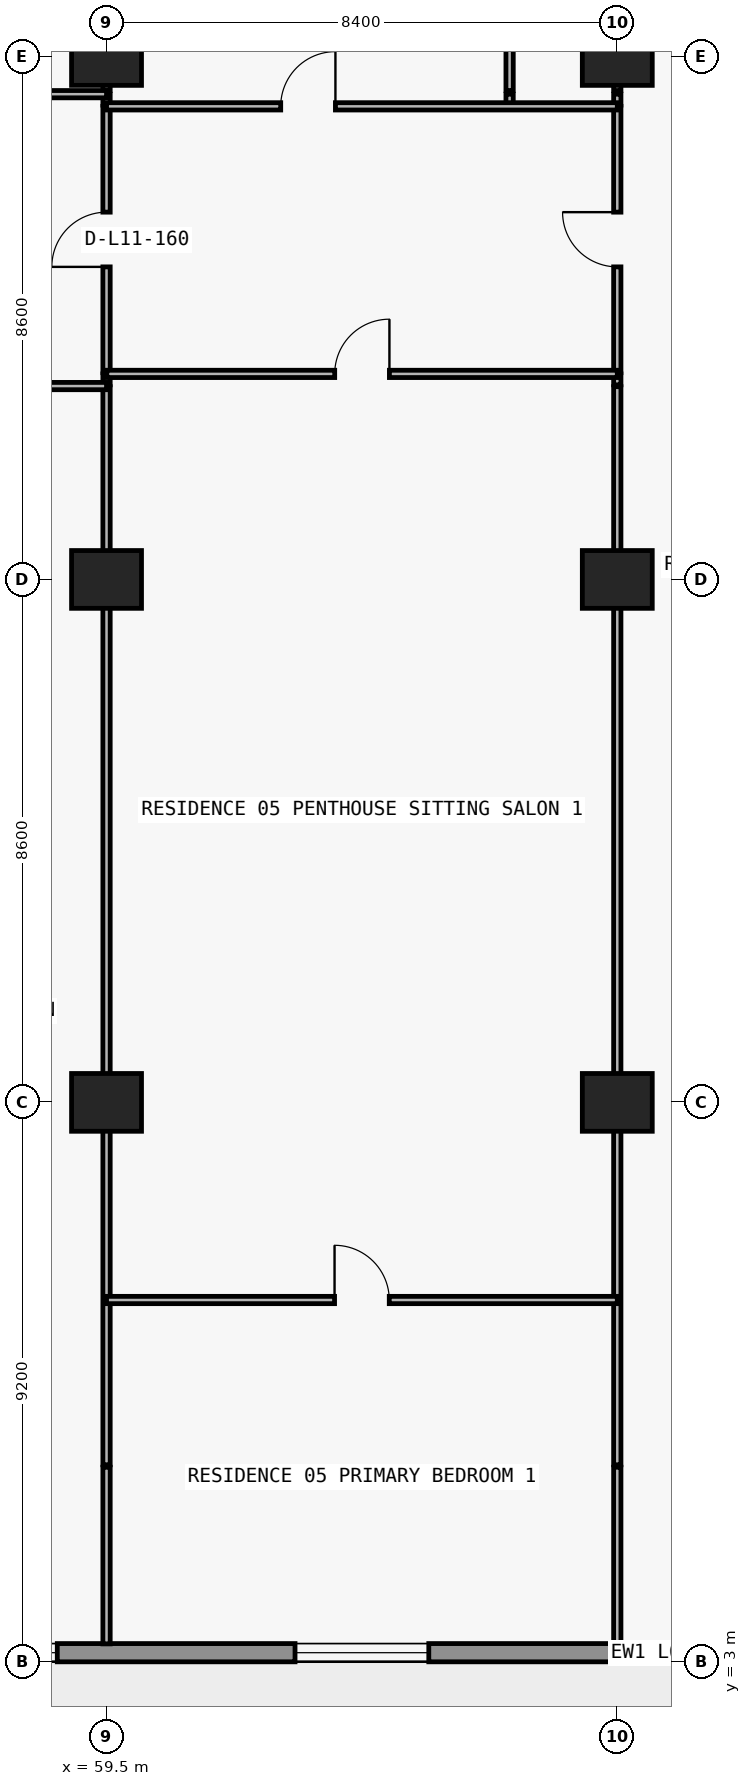
"""IFC4 building model, lengths in metres.
Left out: names, types, materials, properties, quantities, classifications, styles, units other than length and angle.
Written with IfcOpenShell. Run it as: python <this file> out.ifc"""

import sys

from ifc_helpers import new_model, si_unit, direction, frame, frame_2d, origin, origin_2d, place, context, subcontext, project, spatial, rectangle, extrude, element, fill, save


model = new_model("IFC4")
c1 = context("Model", 3, precision=1e-05, world=origin(), true_north=direction((0.0, 1.0)))
c2 = subcontext(c1, "Body", "Model", "MODEL_VIEW")
j1 = project(units=[si_unit("LENGTHUNIT", "METRE"), si_unit("PLANEANGLEUNIT", "RADIAN")], contexts=[c1])
p1 = place(None, origin())
s1 = spatial("IfcSite", under=j1, at=p1, CompositionType="ELEMENT")
p2 = place(p1, origin())
s2 = spatial("IfcBuilding", under=s1, at=p2, CompositionType="ELEMENT")
p3 = place(p2, frame((0.0, 0.0, 46.5)))
s3 = spatial("IfcBuildingStorey", under=s2, at=p3, CompositionType="ELEMENT", Elevation=46.5)
for number, where, z_axis, x_axis in (
    (1, (59.5, 12.2, 0.0), (0.0, 0.0, 1.0), (1.0, 0.0, 0.0)),
    (2, (67.9, 12.2, 0.0), (0.0, 0.0, 1.0), (1.0, 0.0, 0.0)),
    (3, (59.5, 20.8, 0.0), (0.0, 0.0, 1.0), (1.0, 0.0, 0.0)),
    (4, (67.9, 20.8, 0.0), (0.0, 0.0, 1.0), (1.0, 0.0, 0.0)),
    (5, (59.5, 29.4, 0.0), (0.0, 0.0, 1.0), (1.0, 0.0, 0.0)),
    (6, (67.9, 29.4, 0.0), (0.0, 0.0, 1.0), (1.0, 0.0, 0.0)),
):
    element("IfcColumn", number, at=place(p3, frame(where, z_axis=z_axis, x_axis=x_axis)), inside=s3, PredefinedType="COLUMN", context=c2, shape_type="SweptSolid", body=[
        extrude(rectangle(XDim=1.15, YDim=0.95, at=origin_2d()), origin(), (0.0, 0.0, 1.0), 3.05),
    ])
p4 = place(p3, frame((72.7, 3.15, 0.0), z_axis=(0.0, 0.0, 1.0), x_axis=(-1.0, 0.0, 0.0)))
e7 = element("IfcWall", 7, at=p4, inside=s3, PredefinedType="STANDARD", context=c2, shape_type="SweptSolid", body=[
    extrude(rectangle(XDim=67.6, YDim=0.3, at=frame_2d((33.8, 0.0))), origin(), (0.0, 0.0, 1.0), 3.05),
])
p5 = place(p4, frame((59.89, 0.0, 0.0)))
e8 = element("IfcOpeningElement", 8, at=p5, cuts=e7, PredefinedType="OPENING", context=c2, shape_type="SweptSolid", body=[
    extrude(rectangle(XDim=2.0, YDim=2.3, at=frame_2d((1.0, 1.15))), frame((0.0, 0.16, 0.0), z_axis=(0.0, -1.0, 0.0), x_axis=(1.0, 0.0, 0.0)), (0.0, 0.0, 1.0), 0.32),
])
p6 = place(p4, frame((55.21, 0.0, 0.65)))
e9 = element("IfcOpeningElement", 9, at=p6, cuts=e7, PredefinedType="OPENING", context=c2, shape_type="SweptSolid", body=[
    extrude(rectangle(XDim=2.6, YDim=1.85, at=frame_2d((1.3, 0.925))), frame((0.0, 0.16, 0.0), z_axis=(0.0, -1.0, 0.0), x_axis=(1.0, 0.0, 0.0)), (0.0, 0.0, 1.0), 0.32),
])
p7 = place(p4, frame((49.1, 0.0, 0.85)))
e10 = element("IfcOpeningElement", 10, at=p7, cuts=e7, PredefinedType="OPENING", context=c2, shape_type="SweptSolid", body=[
    extrude(rectangle(XDim=2.2, YDim=1.55, at=frame_2d((1.1, 0.775))), frame((0.0, 0.16, 0.0), z_axis=(0.0, -1.0, 0.0), x_axis=(1.0, 0.0, 0.0)), (0.0, 0.0, 1.0), 0.32),
])
p8 = place(p4, frame((42.69, 0.0, 0.0)))
e11 = element("IfcOpeningElement", 11, at=p8, cuts=e7, PredefinedType="OPENING", context=c2, shape_type="SweptSolid", body=[
    extrude(rectangle(XDim=2.0, YDim=2.3, at=frame_2d((1.0, 1.15))), frame((0.0, 0.16, 0.0), z_axis=(0.0, -1.0, 0.0), x_axis=(1.0, 0.0, 0.0)), (0.0, 0.0, 1.0), 0.32),
])
p9 = place(p4, frame((38.59, 0.0, 0.85)))
e12 = element("IfcOpeningElement", 12, at=p9, cuts=e7, PredefinedType="OPENING", context=c2, shape_type="SweptSolid", body=[
    extrude(rectangle(XDim=1.8, YDim=1.55, at=frame_2d((0.9, 0.775))), frame((0.0, 0.16, 0.0), z_axis=(0.0, -1.0, 0.0), x_axis=(1.0, 0.0, 0.0)), (0.0, 0.0, 1.0), 0.32),
])
p10 = place(p4, frame((30.914, 0.0, 0.85)))
e13 = element("IfcOpeningElement", 13, at=p10, cuts=e7, PredefinedType="OPENING", context=c2, shape_type="SweptSolid", body=[
    extrude(rectangle(XDim=2.2, YDim=1.55, at=frame_2d((1.1, 0.775))), frame((0.0, 0.16, 0.0), z_axis=(0.0, -1.0, 0.0), x_axis=(1.0, 0.0, 0.0)), (0.0, 0.0, 1.0), 0.32),
])
p11 = place(p4, frame((26.69, 0.0, 0.0)))
e14 = element("IfcOpeningElement", 14, at=p11, cuts=e7, PredefinedType="OPENING", context=c2, shape_type="SweptSolid", body=[
    extrude(rectangle(XDim=2.0, YDim=2.3, at=frame_2d((1.0, 1.15))), frame((0.0, 0.16, 0.0), z_axis=(0.0, -1.0, 0.0), x_axis=(1.0, 0.0, 0.0)), (0.0, 0.0, 1.0), 0.32),
])
p12 = place(p4, frame((22.59, 0.0, 0.85)))
e15 = element("IfcOpeningElement", 15, at=p12, cuts=e7, PredefinedType="OPENING", context=c2, shape_type="SweptSolid", body=[
    extrude(rectangle(XDim=1.8, YDim=1.55, at=frame_2d((0.9, 0.775))), frame((0.0, 0.16, 0.0), z_axis=(0.0, -1.0, 0.0), x_axis=(1.0, 0.0, 0.0)), (0.0, 0.0, 1.0), 0.32),
])
p13 = place(p4, frame((18.69, 0.0, 0.0)))
e16 = element("IfcOpeningElement", 16, at=p13, cuts=e7, PredefinedType="OPENING", context=c2, shape_type="SweptSolid", body=[
    extrude(rectangle(XDim=2.0, YDim=2.3, at=frame_2d((1.0, 1.15))), frame((0.0, 0.16, 0.0), z_axis=(0.0, -1.0, 0.0), x_axis=(1.0, 0.0, 0.0)), (0.0, 0.0, 1.0), 0.32),
])
p14 = place(p4, frame((14.01, 0.0, 0.65)))
e17 = element("IfcOpeningElement", 17, at=p14, cuts=e7, PredefinedType="OPENING", context=c2, shape_type="SweptSolid", body=[
    extrude(rectangle(XDim=2.6, YDim=1.85, at=frame_2d((1.3, 0.925))), frame((0.0, 0.16, 0.0), z_axis=(0.0, -1.0, 0.0), x_axis=(1.0, 0.0, 0.0)), (0.0, 0.0, 1.0), 0.32),
])
p15 = place(p4, frame((7.9, 0.0, 0.85)))
e18 = element("IfcOpeningElement", 18, at=p15, cuts=e7, PredefinedType="OPENING", context=c2, shape_type="SweptSolid", body=[
    extrude(rectangle(XDim=2.2, YDim=1.55, at=frame_2d((1.1, 0.775))), frame((0.0, 0.16, 0.0), z_axis=(0.0, -1.0, 0.0), x_axis=(1.0, 0.0, 0.0)), (0.0, 0.0, 1.0), 0.32),
])
p16 = place(p3, frame((59.5, 3.295, 0.0), z_axis=(0.0, 0.0, 1.0), x_axis=(0.0, 1.0, 0.0)))
e19 = element("IfcWall", 19, at=p16, inside=s3, PredefinedType="PARTITIONING", context=c2, shape_type="SweptSolid", body=[
    extrude(rectangle(XDim=2.905, YDim=0.12, at=frame_2d((1.453, 0.0))), origin(), (0.0, 0.0, 1.0), 3.05),
])
p17 = place(p3, frame((59.5, 6.24, 0.0), z_axis=(0.0, 0.0, 1.0), x_axis=(0.0, 1.0, 0.0)))
e20 = element("IfcWall", 20, at=p17, inside=s3, PredefinedType="PARTITIONING", context=c2, shape_type="SweptSolid", body=[
    extrude(rectangle(XDim=17.73, YDim=0.12, at=frame_2d((8.865, 0.0))), origin(), (0.0, 0.0, 1.0), 2.11),
])
p18 = place(p3, frame((59.5, 24.0, 0.0), z_axis=(0.0, 0.0, 1.0), x_axis=(0.0, 1.0, 0.0)))
e21 = element("IfcWall", 21, at=p18, inside=s3, PredefinedType="PARTITIONING", context=c2, shape_type="SweptSolid", body=[
    extrude(rectangle(XDim=0.18, YDim=0.12, at=frame_2d((0.09, 0.0))), origin(), (0.0, 0.0, 1.0), 2.11),
])
p19 = place(p3, frame((59.5, 24.2, 0.0), z_axis=(0.0, 0.0, 1.0), x_axis=(0.0, 1.0, 0.0)))
e22 = element("IfcWall", 22, at=p19, inside=s3, PredefinedType="PARTITIONING", context=c2, shape_type="SweptSolid", body=[
    extrude(rectangle(XDim=4.38, YDim=0.12, at=frame_2d((2.19, 0.0))), origin(), (0.0, 0.0, 1.0), 2.11),
])
p20 = place(p19, frame((1.74, 0.0, 0.0)))
e23 = element("IfcOpeningElement", 23, at=p20, cuts=e22, PredefinedType="OPENING", context=c2, shape_type="SweptSolid", body=[
    extrude(rectangle(XDim=0.9, YDim=2.06, at=frame_2d((0.45, 1.03))), frame((0.0, 0.07, 0.0), z_axis=(0.0, -1.0, 0.0), x_axis=(1.0, 0.0, 0.0)), (0.0, 0.0, 1.0), 0.14),
])
p21 = place(p3, frame((59.5, 28.6, 0.0), z_axis=(0.0, 0.0, 1.0), x_axis=(0.0, 1.0, 0.0)))
e24 = element("IfcWall", 24, at=p21, inside=s3, PredefinedType="PARTITIONING", context=c2, shape_type="SweptSolid", body=[
    extrude(rectangle(XDim=0.18, YDim=0.12, at=frame_2d((0.09, 0.0))), origin(), (0.0, 0.0, 1.0), 2.11),
])
p22 = place(p3, frame((59.5, 28.84, 0.0), z_axis=(0.0, 0.0, 1.0), x_axis=(0.0, 1.0, 0.0)))
e25 = element("IfcWall", 25, at=p22, inside=s3, PredefinedType="PARTITIONING", context=c2, shape_type="SweptSolid", body=[
    extrude(rectangle(XDim=5.16, YDim=0.12, at=frame_2d((2.58, 0.0))), origin(), (0.0, 0.0, 1.0), 2.11),
])
p23 = place(p3, frame((66.129, 28.6, 0.0), z_axis=(0.0, 0.0, 1.0), x_axis=(0.0, 1.0, 0.0)))
e26 = element("IfcWall", 26, at=p23, inside=s3, PredefinedType="PARTITIONING", context=c2, shape_type="SweptSolid", body=[
    extrude(rectangle(XDim=0.18, YDim=0.12, at=frame_2d((0.09, 0.0))), origin(), (0.0, 0.0, 1.0), 3.05),
])
p24 = place(p3, frame((66.129, 28.84, 0.0), z_axis=(0.0, 0.0, 1.0), x_axis=(0.0, 1.0, 0.0)))
e27 = element("IfcWall", 27, at=p24, inside=s3, PredefinedType="PARTITIONING", context=c2, shape_type="SweptSolid", body=[
    extrude(rectangle(XDim=5.16, YDim=0.12, at=frame_2d((2.58, 0.0))), origin(), (0.0, 0.0, 1.0), 3.05),
])
p25 = place(p24, frame((2.155, 0.0, 0.0)))
e28 = element("IfcOpeningElement", 28, at=p25, cuts=e27, PredefinedType="OPENING", context=c2, shape_type="SweptSolid", body=[
    extrude(rectangle(XDim=0.85, YDim=2.1, at=frame_2d((0.425, 1.05))), frame((0.0, 0.07, 0.0), z_axis=(0.0, -1.0, 0.0), x_axis=(1.0, 0.0, 0.0)), (0.0, 0.0, 1.0), 0.14),
])
p26 = place(p3, frame((67.9, 3.295, 0.0), z_axis=(0.0, 0.0, 1.0), x_axis=(0.0, 1.0, 0.0)))
e29 = element("IfcWall", 29, at=p26, inside=s3, PredefinedType="PARTITIONING", context=c2, shape_type="SweptSolid", body=[
    extrude(rectangle(XDim=2.905, YDim=0.12, at=frame_2d((1.453, 0.0))), origin(), (0.0, 0.0, 1.0), 3.05),
])
p27 = place(p3, frame((67.9, 6.24, 0.0), z_axis=(0.0, 0.0, 1.0), x_axis=(0.0, 1.0, 0.0)))
e30 = element("IfcWall", 30, at=p27, inside=s3, PredefinedType="PARTITIONING", context=c2, shape_type="SweptSolid", body=[
    extrude(rectangle(XDim=17.73, YDim=0.12, at=frame_2d((8.865, 0.0))), origin(), (0.0, 0.0, 1.0), 2.11),
])
p28 = place(p3, frame((67.9, 24.0, 0.0), z_axis=(0.0, 0.0, 1.0), x_axis=(0.0, 1.0, 0.0)))
e31 = element("IfcWall", 31, at=p28, inside=s3, PredefinedType="PARTITIONING", context=c2, shape_type="SweptSolid", body=[
    extrude(rectangle(XDim=0.18, YDim=0.12, at=frame_2d((0.09, 0.0))), origin(), (0.0, 0.0, 1.0), 2.11),
])
p29 = place(p3, frame((67.9, 24.2, 0.0), z_axis=(0.0, 0.0, 1.0), x_axis=(0.0, 1.0, 0.0)))
e32 = element("IfcWall", 32, at=p29, inside=s3, PredefinedType="PARTITIONING", context=c2, shape_type="SweptSolid", body=[
    extrude(rectangle(XDim=4.38, YDim=0.12, at=frame_2d((2.19, 0.0))), origin(), (0.0, 0.0, 1.0), 2.11),
])
p30 = place(p29, frame((1.74, 0.0, 0.0)))
e33 = element("IfcOpeningElement", 33, at=p30, cuts=e32, PredefinedType="OPENING", context=c2, shape_type="SweptSolid", body=[
    extrude(rectangle(XDim=0.9, YDim=2.06, at=frame_2d((0.45, 1.03))), frame((0.0, 0.07, 0.0), z_axis=(0.0, -1.0, 0.0), x_axis=(1.0, 0.0, 0.0)), (0.0, 0.0, 1.0), 0.14),
])
p31 = place(p3, frame((67.9, 28.6, 0.0), z_axis=(0.0, 0.0, 1.0), x_axis=(0.0, 1.0, 0.0)))
e34 = element("IfcWall", 34, at=p31, inside=s3, PredefinedType="PARTITIONING", context=c2, shape_type="SweptSolid", body=[
    extrude(rectangle(XDim=0.18, YDim=0.12, at=frame_2d((0.09, 0.0))), origin(), (0.0, 0.0, 1.0), 2.11),
])
p32 = place(p3, frame((67.9, 28.84, 0.0), z_axis=(0.0, 0.0, 1.0), x_axis=(0.0, 1.0, 0.0)))
e35 = element("IfcWall", 35, at=p32, inside=s3, PredefinedType="PARTITIONING", context=c2, shape_type="SweptSolid", body=[
    extrude(rectangle(XDim=5.16, YDim=0.12, at=frame_2d((2.58, 0.0))), origin(), (0.0, 0.0, 1.0), 2.11),
])
p33 = place(p3, frame((59.5, 8.95, 0.0), z_axis=(0.0, 0.0, 1.0), x_axis=(1.0, 0.0, 0.0)))
e36 = element("IfcWall", 36, at=p33, inside=s3, PredefinedType="PARTITIONING", context=c2, shape_type="SweptSolid", body=[
    extrude(rectangle(XDim=8.4, YDim=0.12, at=frame_2d((4.2, 0.0))), origin(), (0.0, 0.0, 1.0), 3.05),
])
p34 = place(p33, frame((3.75, 0.0, 0.0)))
e37 = element("IfcOpeningElement", 37, at=p34, cuts=e36, PredefinedType="OPENING", context=c2, shape_type="SweptSolid", body=[
    extrude(rectangle(XDim=0.9, YDim=2.15, at=frame_2d((0.45, 1.075))), frame((0.0, 0.07, 0.0), z_axis=(0.0, -1.0, 0.0), x_axis=(1.0, 0.0, 0.0)), (0.0, 0.0, 1.0), 0.14),
])
p35 = place(p3, frame((51.37, 23.98, 0.0), z_axis=(0.0, 0.0, 1.0), x_axis=(1.0, 0.0, 0.0)))
e38 = element("IfcWall", 38, at=p35, inside=s3, PredefinedType="PARTITIONING", context=c2, shape_type="SweptSolid", body=[
    extrude(rectangle(XDim=8.13, YDim=0.12, at=frame_2d((4.065, 0.0))), origin(), (0.0, 0.0, 1.0), 3.05),
])
p36 = place(p35, frame((1.305, 0.0, 0.0)))
e39 = element("IfcOpeningElement", 39, at=p36, cuts=e38, PredefinedType="OPENING", context=c2, shape_type="SweptSolid", body=[
    extrude(rectangle(XDim=0.9, YDim=2.15, at=frame_2d((0.45, 1.075))), frame((0.0, 0.07, 0.0), z_axis=(0.0, -1.0, 0.0), x_axis=(1.0, 0.0, 0.0)), (0.0, 0.0, 1.0), 0.14),
])
p37 = place(p3, frame((59.505, 24.18, 0.0), z_axis=(0.0, 0.0, 1.0), x_axis=(1.0, 0.0, 0.0)))
e40 = element("IfcWall", 40, at=p37, inside=s3, PredefinedType="PARTITIONING", context=c2, shape_type="SweptSolid", body=[
    extrude(rectangle(XDim=8.395, YDim=0.12, at=frame_2d((4.198, 0.0))), origin(), (0.0, 0.0, 1.0), 3.05),
])
p38 = place(p37, frame((3.748, 0.0, 0.0)))
e41 = element("IfcOpeningElement", 41, at=p38, cuts=e40, PredefinedType="OPENING", context=c2, shape_type="SweptSolid", body=[
    extrude(rectangle(XDim=0.9, YDim=2.15, at=frame_2d((0.45, 1.075))), frame((0.0, 0.07, 0.0), z_axis=(0.0, -1.0, 0.0), x_axis=(1.0, 0.0, 0.0)), (0.0, 0.0, 1.0), 0.14),
])
p39 = place(p3, frame((59.5, 28.58, 0.0), z_axis=(0.0, 0.0, 1.0), x_axis=(1.0, 0.0, 0.0)))
e42 = element("IfcWall", 42, at=p39, inside=s3, PredefinedType="PARTITIONING", context=c2, shape_type="SweptSolid", body=[
    extrude(rectangle(XDim=8.4, YDim=0.12, at=frame_2d((4.2, 0.0))), origin(), (0.0, 0.0, 1.0), 3.05),
])
p40 = place(p39, frame((2.865, 0.0, 0.0)))
e43 = element("IfcOpeningElement", 43, at=p40, cuts=e42, PredefinedType="OPENING", context=c2, shape_type="SweptSolid", body=[
    extrude(rectangle(XDim=0.9, YDim=2.15, at=frame_2d((0.45, 1.075))), frame((0.0, 0.07, 0.0), z_axis=(0.0, -1.0, 0.0), x_axis=(1.0, 0.0, 0.0)), (0.0, 0.0, 1.0), 0.14),
])
p41 = place(p3, frame((51.37, 28.78, 0.0), z_axis=(0.0, 0.0, 1.0), x_axis=(1.0, 0.0, 0.0)))
e44 = element("IfcWall", 44, at=p41, inside=s3, PredefinedType="PARTITIONING", context=c2, shape_type="SweptSolid", body=[
    extrude(rectangle(XDim=8.13, YDim=0.12, at=frame_2d((4.065, 0.0))), origin(), (0.0, 0.0, 1.0), 3.05),
])
p42 = place(p41, frame((1.305, 0.0, 0.0)))
e45 = element("IfcOpeningElement", 45, at=p42, cuts=e44, PredefinedType="OPENING", context=c2, shape_type="SweptSolid", body=[
    extrude(rectangle(XDim=0.9, YDim=2.15, at=frame_2d((0.45, 1.075))), frame((0.0, 0.07, 0.0), z_axis=(0.0, -1.0, 0.0), x_axis=(1.0, 0.0, 0.0)), (0.0, 0.0, 1.0), 0.14),
])
p43 = place(p14, origin())
e46 = element("IfcWindow", 46, at=p43, inside=s3, PartitioningType="SINGLE_PANEL", PredefinedType="WINDOW", context=c2, shape_type="SweptSolid", body=[
    extrude(rectangle(XDim=2.6, YDim=1.85, at=frame_2d((1.3, 0.925))), frame((0.0, 0.03, 0.0), z_axis=(0.0, -1.0, 0.0), x_axis=(1.0, 0.0, 0.0)), (0.0, 0.0, 1.0), 0.06),
])
fill(e17, e46)
p44 = place(p15, origin())
e47 = element("IfcWindow", 47, at=p44, inside=s3, PartitioningType="SINGLE_PANEL", PredefinedType="WINDOW", context=c2, shape_type="SweptSolid", body=[
    extrude(rectangle(XDim=2.2, YDim=1.55, at=frame_2d((1.1, 0.775))), frame((0.0, 0.03, 0.0), z_axis=(0.0, -1.0, 0.0), x_axis=(1.0, 0.0, 0.0)), (0.0, 0.0, 1.0), 0.06),
])
fill(e18, e47)
p45 = place(p20, origin())
e48 = element("IfcDoor", 48, at=p45, inside=s3, OperationType="SINGLE_SWING_LEFT", PredefinedType="DOOR", context=c2, shape_type="SweptSolid", body=[
    extrude(rectangle(XDim=0.9, YDim=2.06, at=frame_2d((0.45, 1.03))), frame((0.0, 0.025, 0.0), z_axis=(0.0, -1.0, 0.0), x_axis=(1.0, 0.0, 0.0)), (0.0, 0.0, 1.0), 0.05),
])
fill(e23, e48)
p46 = place(p40, origin())
e49 = element("IfcDoor", 49, at=p46, inside=s3, OperationType="SINGLE_SWING_RIGHT", PredefinedType="DOOR", context=c2, shape_type="SweptSolid", body=[
    extrude(rectangle(XDim=0.9, YDim=2.15, at=frame_2d((0.45, 1.075))), frame((0.0, 0.025, 0.0), z_axis=(0.0, -1.0, 0.0), x_axis=(1.0, 0.0, 0.0)), (0.0, 0.0, 1.0), 0.05),
])
fill(e43, e49)
p47 = place(p38, origin())
e50 = element("IfcDoor", 50, at=p47, inside=s3, OperationType="SINGLE_SWING_RIGHT", PredefinedType="DOOR", context=c2, shape_type="SweptSolid", body=[
    extrude(rectangle(XDim=0.9, YDim=2.15, at=frame_2d((0.45, 1.075))), frame((0.0, 0.025, 0.0), z_axis=(0.0, -1.0, 0.0), x_axis=(1.0, 0.0, 0.0)), (0.0, 0.0, 1.0), 0.05),
])
fill(e41, e50)
p48 = place(p34, origin())
e51 = element("IfcDoor", 51, at=p48, inside=s3, OperationType="SINGLE_SWING_LEFT", PredefinedType="DOOR", context=c2, shape_type="SweptSolid", body=[
    extrude(rectangle(XDim=0.9, YDim=2.15, at=frame_2d((0.45, 1.075))), frame((0.0, 0.025, 0.0), z_axis=(0.0, -1.0, 0.0), x_axis=(1.0, 0.0, 0.0)), (0.0, 0.0, 1.0), 0.05),
])
fill(e37, e51)
p49 = place(p30, origin())
e52 = element("IfcDoor", 52, at=p49, inside=s3, OperationType="SINGLE_SWING_RIGHT", PredefinedType="DOOR", context=c2, shape_type="SweptSolid", body=[
    extrude(rectangle(XDim=0.9, YDim=2.06, at=frame_2d((0.45, 1.03))), frame((0.0, 0.025, 0.0), z_axis=(0.0, -1.0, 0.0), x_axis=(1.0, 0.0, 0.0)), (0.0, 0.0, 1.0), 0.05),
])
fill(e33, e52)
save(model, sys.argv[1])
